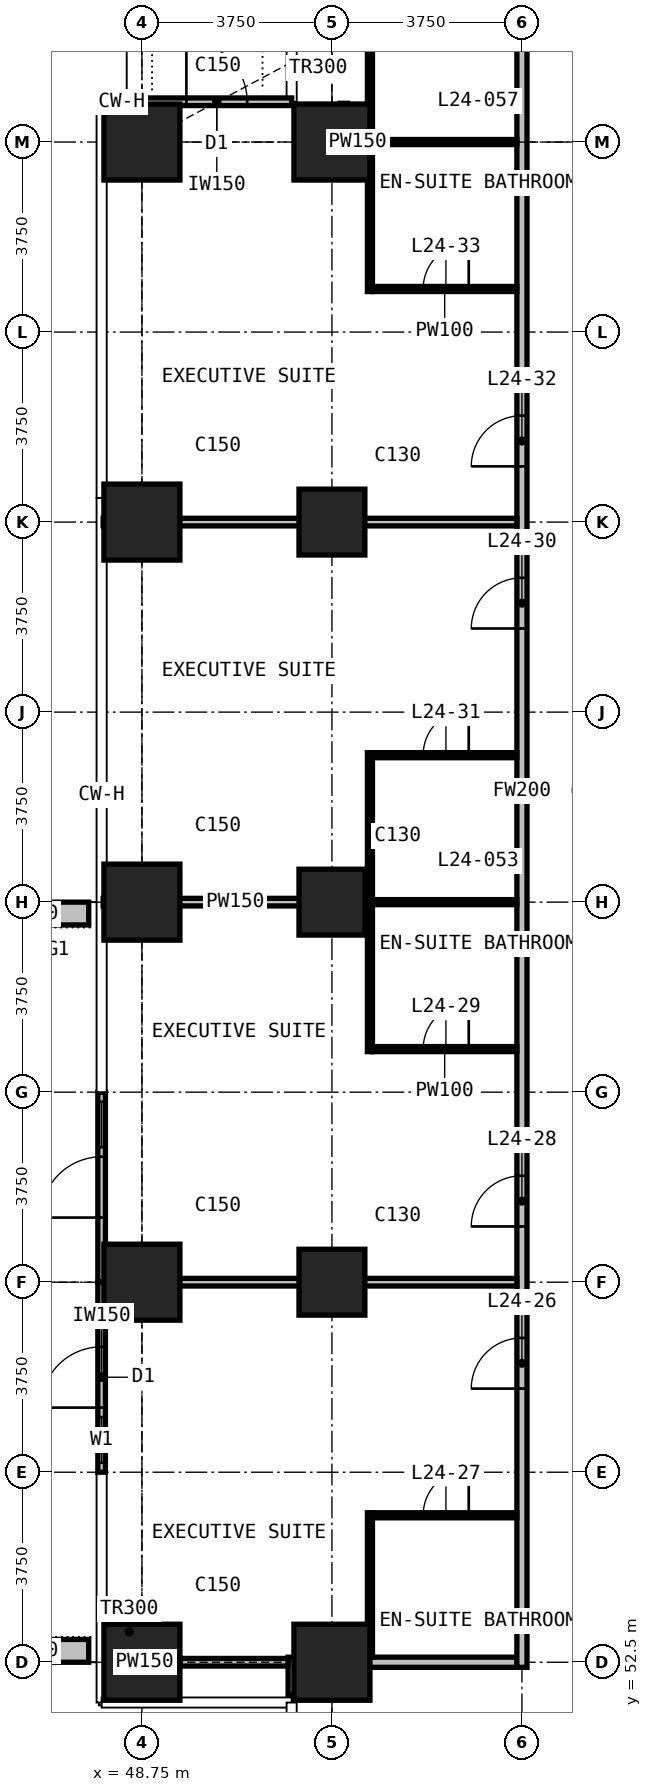
"""IFC4 building model, lengths in metres.
Left out: names, types, materials, properties, quantities, classifications, styles, units other than length and angle.
Written with IfcOpenShell. Run it as: python <this file> out.ifc"""

import sys

from ifc_helpers import new_model, si_unit, direction, frame, frame_2d, origin, origin_2d, place, context, subcontext, project, spatial, rectangle, extrude, element, fill, save


model = new_model("IFC4")
c1 = context("Model", 3, precision=1e-05, world=origin(), true_north=direction((0.0, 1.0)))
c2 = subcontext(c1, "Body", "Model", "MODEL_VIEW")
j1 = project(units=[si_unit("LENGTHUNIT", "METRE"), si_unit("PLANEANGLEUNIT", "RADIAN")], contexts=[c1])
p1 = place(None, origin())
s1 = spatial("IfcSite", under=j1, at=p1, CompositionType="ELEMENT")
p2 = place(p1, origin())
s2 = spatial("IfcBuilding", under=s1, at=p2, CompositionType="ELEMENT")
p3 = place(p2, frame((0.0, 0.0, 98.9)))
s3 = spatial("IfcBuildingStorey", under=s2, at=p3, CompositionType="ELEMENT", Elevation=98.9)
for number, where, z_axis, x_axis in (
    (1, (48.75, 52.5, 0.0), (0.0, 0.0, 1.0), (1.0, 0.0, 0.0)),
    (2, (48.75, 60.0, 0.0), (0.0, 0.0, 1.0), (1.0, 0.0, 0.0)),
    (3, (48.75, 67.5, 0.0), (0.0, 0.0, 1.0), (1.0, 0.0, 0.0)),
    (4, (48.75, 75.0, 0.0), (0.0, 0.0, 1.0), (1.0, 0.0, 0.0)),
    (5, (48.75, 82.5, 0.0), (0.0, 0.0, 1.0), (1.0, 0.0, 0.0)),
    (6, (52.5, 52.5, 0.0), (0.0, 0.0, 1.0), (1.0, 0.0, 0.0)),
):
    element("IfcColumn", number, at=place(p3, frame(where, z_axis=z_axis, x_axis=x_axis)), inside=s3, PredefinedType="COLUMN", context=c2, shape_type="SweptSolid", body=[
        extrude(rectangle(XDim=1.5, YDim=1.5, at=origin_2d()), origin(), (0.0, 0.0, 1.0), 3.3),
    ])
for number, where, z_axis, x_axis in (
    (7, (52.5, 60.0, 0.0), (0.0, 0.0, 1.0), (1.0, 0.0, 0.0)),
    (8, (52.5, 67.5, 0.0), (0.0, 0.0, 1.0), (1.0, 0.0, 0.0)),
    (9, (52.5, 75.0, 0.0), (0.0, 0.0, 1.0), (1.0, 0.0, 0.0)),
):
    element("IfcColumn", number, at=place(p3, frame(where, z_axis=z_axis, x_axis=x_axis)), inside=s3, PredefinedType="COLUMN", context=c2, shape_type="SweptSolid", body=[
        extrude(rectangle(XDim=1.3, YDim=1.3, at=origin_2d()), origin(), (0.0, 0.0, 1.0), 3.3),
    ])
p4 = place(p3, frame((52.5, 82.5, 0.0), z_axis=(0.0, 0.0, 1.0), x_axis=(1.0, 0.0, 0.0)))
e10 = element("IfcColumn", 10, at=p4, inside=s3, PredefinedType="COLUMN", context=c2, shape_type="SweptSolid", body=[
    extrude(rectangle(XDim=1.5, YDim=1.5, at=origin_2d()), origin(), (0.0, 0.0, 1.0), 3.3),
])
p5 = place(p3, frame((48.75, 83.295, 0.0), z_axis=(0.0, 0.0, 1.0), x_axis=(1.0, 0.0, 0.0)))
e11 = element("IfcWall", 11, at=p5, inside=s3, PredefinedType="SOLIDWALL", context=c2, shape_type="SweptSolid", body=[
    extrude(rectangle(XDim=2.955, YDim=0.15, at=frame_2d((1.478, 0.0))), origin(), (0.0, 0.0, 1.0), 2.95),
])
p6 = place(p5, frame((0.877, 0.0, 0.0)))
e12 = element("IfcOpeningElement", 12, at=p6, cuts=e11, PredefinedType="OPENING", context=c2, shape_type="SweptSolid", body=[
    extrude(rectangle(XDim=1.2, YDim=2.4, at=frame_2d((0.6, 1.2))), frame((0.0, 0.085, 0.0), z_axis=(0.0, -1.0, 0.0), x_axis=(1.0, 0.0, 0.0)), (0.0, 0.0, 1.0), 0.17),
])
p7 = place(p3, frame((47.955, 56.25, 0.0), z_axis=(0.0, 0.0, 1.0), x_axis=(0.0, 1.0, 0.0)))
e13 = element("IfcWall", 13, at=p7, inside=s3, PredefinedType="SOLIDWALL", context=c2, shape_type="SweptSolid", body=[
    extrude(rectangle(XDim=3.75, YDim=0.15, at=frame_2d((1.875, 0.0))), origin(), (0.0, 0.0, 1.0), 2.95),
])
p8 = place(p7, frame((0.188, 0.0, 0.1)))
e14 = element("IfcOpeningElement", 14, at=p8, cuts=e13, PredefinedType="OPENING", context=c2, shape_type="SweptSolid", body=[
    extrude(rectangle(XDim=0.9, YDim=2.4, at=frame_2d((0.45, 1.2))), frame((0.0, 0.085, 0.0), z_axis=(0.0, -1.0, 0.0), x_axis=(1.0, 0.0, 0.0)), (0.0, 0.0, 1.0), 0.17),
])
p9 = place(p7, frame((1.275, 0.0, 0.0)))
e15 = element("IfcOpeningElement", 15, at=p9, cuts=e13, PredefinedType="OPENING", context=c2, shape_type="SweptSolid", body=[
    extrude(rectangle(XDim=1.2, YDim=2.4, at=frame_2d((0.6, 1.2))), frame((0.0, 0.085, 0.0), z_axis=(0.0, -1.0, 0.0), x_axis=(1.0, 0.0, 0.0)), (0.0, 0.0, 1.0), 0.17),
])
p10 = place(p3, frame((47.955, 60.0, 0.0), z_axis=(0.0, 0.0, 1.0), x_axis=(0.0, 1.0, 0.0)))
e16 = element("IfcWall", 16, at=p10, inside=s3, PredefinedType="SOLIDWALL", context=c2, shape_type="SweptSolid", body=[
    extrude(rectangle(XDim=3.75, YDim=0.15, at=frame_2d((1.875, 0.0))), origin(), (0.0, 0.0, 1.0), 2.95),
])
p11 = place(p10, frame((1.275, 0.0, 0.0)))
e17 = element("IfcOpeningElement", 17, at=p11, cuts=e16, PredefinedType="OPENING", context=c2, shape_type="SweptSolid", body=[
    extrude(rectangle(XDim=1.2, YDim=2.4, at=frame_2d((0.6, 1.2))), frame((0.0, 0.085, 0.0), z_axis=(0.0, -1.0, 0.0), x_axis=(1.0, 0.0, 0.0)), (0.0, 0.0, 1.0), 0.17),
])
p12 = place(p10, frame((2.663, 0.0, 0.1)))
e18 = element("IfcOpeningElement", 18, at=p12, cuts=e16, PredefinedType="OPENING", context=c2, shape_type="SweptSolid", body=[
    extrude(rectangle(XDim=0.9, YDim=2.4, at=frame_2d((0.45, 1.2))), frame((0.0, 0.085, 0.0), z_axis=(0.0, -1.0, 0.0), x_axis=(1.0, 0.0, 0.0)), (0.0, 0.0, 1.0), 0.17),
])
for number, where, z_axis, x_axis in (
    (19, (47.7, 52.725, 0.0), (0.0, 0.0, 1.0), (-1.0, 0.0, 0.0)),
    (20, (47.7, 67.275, 0.0), (0.0, 0.0, 1.0), (-1.0, 0.0, 0.0)),
):
    element("IfcWall", number, at=place(p3, frame(where, z_axis=z_axis, x_axis=x_axis)), inside=s3, PredefinedType="USERDEFINED", context=c2, shape_type="SweptSolid", body=[
        extrude(rectangle(XDim=2.35, YDim=0.45, at=frame_2d((1.175, 0.0))), origin(), (0.0, 0.0, 1.0), 1.1),
    ])
p13 = place(p3, frame((51.835, 52.5, 0.0), z_axis=(0.0, 0.0, 1.0), x_axis=(1.0, 0.0, 0.0)))
e21 = element("IfcWall", 21, at=p13, inside=s3, PredefinedType="PARTITIONING", context=c2, shape_type="SweptSolid", body=[
    extrude(rectangle(XDim=4.315, YDim=0.2, at=frame_2d((2.157, 0.0))), origin(), (0.0, 0.0, 1.0), 2.95),
])
p14 = place(p3, frame((51.735, 51.855, 0.0), z_axis=(0.0, 0.0, 1.0), x_axis=(0.0, 1.0, 0.0)))
e22 = element("IfcWall", 22, at=p14, inside=s3, PredefinedType="PARTITIONING", context=c2, shape_type="SweptSolid", body=[
    extrude(rectangle(XDim=0.745, YDim=0.2, at=frame_2d((0.373, 0.0))), origin(), (0.0, 0.0, 1.0), 2.95),
])
p15 = place(p3, frame((56.25, 52.4, 0.0), z_axis=(0.0, 0.0, 1.0), x_axis=(0.0, 1.0, 0.0)))
e23 = element("IfcWall", 23, at=p15, inside=s3, PredefinedType="PARTITIONING", context=c2, shape_type="SweptSolid", body=[
    extrude(rectangle(XDim=34.6, YDim=0.2, at=frame_2d((17.3, 0.0))), origin(), (0.0, 0.0, 1.0), 2.95),
])
p16 = place(p15, frame((5.5, 0.0, 0.0)))
e24 = element("IfcOpeningElement", 24, at=p16, cuts=e23, PredefinedType="OPENING", context=c2, shape_type="SweptSolid", body=[
    extrude(rectangle(XDim=1.0, YDim=2.1, at=frame_2d((0.5, 1.05))), frame((0.0, 0.11, 0.0), z_axis=(0.0, -1.0, 0.0), x_axis=(1.0, 0.0, 0.0)), (0.0, 0.0, 1.0), 0.22),
])
p17 = place(p15, frame((8.7, 0.0, 0.0)))
e25 = element("IfcOpeningElement", 25, at=p17, cuts=e23, PredefinedType="OPENING", context=c2, shape_type="SweptSolid", body=[
    extrude(rectangle(XDim=1.0, YDim=2.2, at=frame_2d((0.5, 1.1))), frame((0.0, 0.11, 0.0), z_axis=(0.0, -1.0, 0.0), x_axis=(1.0, 0.0, 0.0)), (0.0, 0.0, 1.0), 0.22),
])
p18 = place(p15, frame((20.5, 0.0, 0.0)))
e26 = element("IfcOpeningElement", 26, at=p18, cuts=e23, PredefinedType="OPENING", context=c2, shape_type="SweptSolid", body=[
    extrude(rectangle(XDim=1.0, YDim=2.2, at=frame_2d((0.5, 1.1))), frame((0.0, 0.11, 0.0), z_axis=(0.0, -1.0, 0.0), x_axis=(1.0, 0.0, 0.0)), (0.0, 0.0, 1.0), 0.22),
])
p19 = place(p15, frame((23.7, 0.0, 0.0)))
e27 = element("IfcOpeningElement", 27, at=p19, cuts=e23, PredefinedType="OPENING", context=c2, shape_type="SweptSolid", body=[
    extrude(rectangle(XDim=1.0, YDim=2.2, at=frame_2d((0.5, 1.1))), frame((0.0, 0.11, 0.0), z_axis=(0.0, -1.0, 0.0), x_axis=(1.0, 0.0, 0.0)), (0.0, 0.0, 1.0), 0.22),
])
p20 = place(p3, frame((48.105, 52.5, 0.0), z_axis=(0.0, 0.0, 1.0), x_axis=(1.0, 0.0, 0.0)))
e28 = element("IfcWall", 28, at=p20, inside=s3, PredefinedType="PARTITIONING", context=c2, shape_type="SweptSolid", body=[
    extrude(rectangle(XDim=1.395, YDim=0.15, at=frame_2d((0.698, 0.0))), origin(), (0.0, 0.0, 1.0), 2.95),
])
p21 = place(p3, frame((49.5, 52.5, 0.0), z_axis=(0.0, 0.0, 1.0), x_axis=(1.0, 0.0, 0.0)))
e29 = element("IfcWall", 29, at=p21, inside=s3, PredefinedType="PARTITIONING", context=c2, shape_type="SweptSolid", body=[
    extrude(rectangle(XDim=2.135, YDim=0.15, at=frame_2d((1.067, 0.0))), origin(), (0.0, 0.0, 1.0), 2.15),
])
p22 = place(p3, frame((48.04, 60.0, 0.0), z_axis=(0.0, 0.0, 1.0), x_axis=(1.0, 0.0, 0.0)))
e30 = element("IfcWall", 30, at=p22, inside=s3, PredefinedType="PARTITIONING", context=c2, shape_type="SweptSolid", body=[
    extrude(rectangle(XDim=8.11, YDim=0.15, at=frame_2d((4.055, 0.0))), origin(), (0.0, 0.0, 1.0), 2.95),
])
p23 = place(p3, frame((47.985, 67.5, 0.0), z_axis=(0.0, 0.0, 1.0), x_axis=(1.0, 0.0, 0.0)))
e31 = element("IfcWall", 31, at=p23, inside=s3, PredefinedType="PARTITIONING", context=c2, shape_type="SweptSolid", body=[
    extrude(rectangle(XDim=5.215, YDim=0.15, at=frame_2d((2.607, 0.0))), origin(), (0.0, 0.0, 1.0), 2.95),
])
p24 = place(p3, frame((47.985, 75.0, 0.0), z_axis=(0.0, 0.0, 1.0), x_axis=(1.0, 0.0, 0.0)))
e32 = element("IfcWall", 32, at=p24, inside=s3, PredefinedType="PARTITIONING", context=c2, shape_type="SweptSolid", body=[
    extrude(rectangle(XDim=8.165, YDim=0.15, at=frame_2d((4.083, 0.0))), origin(), (0.0, 0.0, 1.0), 2.95),
])
p25 = place(p3, frame((52.81, 82.5, 0.0), z_axis=(0.0, 0.0, 1.0), x_axis=(1.0, 0.0, 0.0)))
e33 = element("IfcWall", 33, at=p25, inside=s3, PredefinedType="PARTITIONING", context=c2, shape_type="SweptSolid", body=[
    extrude(rectangle(XDim=0.39, YDim=0.15, at=frame_2d((0.195, 0.0))), origin(), (0.0, 0.0, 1.0), 2.95),
])
p26 = place(p3, frame((52.735, 82.425, 0.0), z_axis=(0.0, 0.0, 1.0), x_axis=(0.0, 1.0, 0.0)))
e34 = element("IfcWall", 34, at=p26, inside=s3, PredefinedType="PARTITIONING", context=c2, shape_type="SweptSolid", body=[
    extrude(rectangle(XDim=0.84, YDim=0.15, at=frame_2d((0.42, 0.0))), origin(), (0.0, 0.0, 1.0), 2.95),
])
p27 = place(p3, frame((53.3, 55.4, 0.0), z_axis=(0.0, 0.0, 1.0), x_axis=(1.0, 0.0, 0.0)))
e35 = element("IfcWall", 35, at=p27, inside=s3, PredefinedType="PARTITIONING", context=c2, shape_type="SweptSolid", body=[
    extrude(rectangle(XDim=2.85, YDim=0.1, at=frame_2d((1.425, 0.0))), origin(), (0.0, 0.0, 1.0), 2.95),
])
p28 = place(p27, frame((1.0, 0.0, 0.0)))
e36 = element("IfcOpeningElement", 36, at=p28, cuts=e35, PredefinedType="OPENING", context=c2, shape_type="SweptSolid", body=[
    extrude(rectangle(XDim=0.9, YDim=2.2, at=frame_2d((0.45, 1.1))), frame((0.0, 0.06, 0.0), z_axis=(0.0, -1.0, 0.0), x_axis=(1.0, 0.0, 0.0)), (0.0, 0.0, 1.0), 0.12),
])
p29 = place(p3, frame((53.3, 64.6, 0.0), z_axis=(0.0, 0.0, 1.0), x_axis=(1.0, 0.0, 0.0)))
e37 = element("IfcWall", 37, at=p29, inside=s3, PredefinedType="PARTITIONING", context=c2, shape_type="SweptSolid", body=[
    extrude(rectangle(XDim=2.85, YDim=0.1, at=frame_2d((1.425, 0.0))), origin(), (0.0, 0.0, 1.0), 2.95),
])
p30 = place(p29, frame((1.0, 0.0, 0.0)))
e38 = element("IfcOpeningElement", 38, at=p30, cuts=e37, PredefinedType="OPENING", context=c2, shape_type="SweptSolid", body=[
    extrude(rectangle(XDim=0.9, YDim=2.2, at=frame_2d((0.45, 1.1))), frame((0.0, 0.06, 0.0), z_axis=(0.0, -1.0, 0.0), x_axis=(1.0, 0.0, 0.0)), (0.0, 0.0, 1.0), 0.12),
])
p31 = place(p3, frame((53.3, 67.5, 0.0), z_axis=(0.0, 0.0, 1.0), x_axis=(1.0, 0.0, 0.0)))
e39 = element("IfcWall", 39, at=p31, inside=s3, PredefinedType="PARTITIONING", context=c2, shape_type="SweptSolid", body=[
    extrude(rectangle(XDim=2.85, YDim=0.1, at=frame_2d((1.425, 0.0))), origin(), (0.0, 0.0, 1.0), 2.95),
])
p32 = place(p3, frame((53.3, 70.4, 0.0), z_axis=(0.0, 0.0, 1.0), x_axis=(1.0, 0.0, 0.0)))
e40 = element("IfcWall", 40, at=p32, inside=s3, PredefinedType="PARTITIONING", context=c2, shape_type="SweptSolid", body=[
    extrude(rectangle(XDim=2.85, YDim=0.1, at=frame_2d((1.425, 0.0))), origin(), (0.0, 0.0, 1.0), 2.95),
])
p33 = place(p32, frame((1.0, 0.0, 0.0)))
e41 = element("IfcOpeningElement", 41, at=p33, cuts=e40, PredefinedType="OPENING", context=c2, shape_type="SweptSolid", body=[
    extrude(rectangle(XDim=0.9, YDim=2.2, at=frame_2d((0.45, 1.1))), frame((0.0, 0.06, 0.0), z_axis=(0.0, -1.0, 0.0), x_axis=(1.0, 0.0, 0.0)), (0.0, 0.0, 1.0), 0.12),
])
p34 = place(p3, frame((53.3, 79.6, 0.0), z_axis=(0.0, 0.0, 1.0), x_axis=(1.0, 0.0, 0.0)))
e42 = element("IfcWall", 42, at=p34, inside=s3, PredefinedType="PARTITIONING", context=c2, shape_type="SweptSolid", body=[
    extrude(rectangle(XDim=2.85, YDim=0.1, at=frame_2d((1.425, 0.0))), origin(), (0.0, 0.0, 1.0), 2.95),
])
p35 = place(p34, frame((1.0, 0.0, 0.0)))
e43 = element("IfcOpeningElement", 43, at=p35, cuts=e42, PredefinedType="OPENING", context=c2, shape_type="SweptSolid", body=[
    extrude(rectangle(XDim=0.9, YDim=2.2, at=frame_2d((0.45, 1.1))), frame((0.0, 0.06, 0.0), z_axis=(0.0, -1.0, 0.0), x_axis=(1.0, 0.0, 0.0)), (0.0, 0.0, 1.0), 0.12),
])
p36 = place(p3, frame((53.3, 82.5, 0.0), z_axis=(0.0, 0.0, 1.0), x_axis=(1.0, 0.0, 0.0)))
e44 = element("IfcWall", 44, at=p36, inside=s3, PredefinedType="PARTITIONING", context=c2, shape_type="SweptSolid", body=[
    extrude(rectangle(XDim=2.85, YDim=0.1, at=frame_2d((1.425, 0.0))), origin(), (0.0, 0.0, 1.0), 2.05),
])
p37 = place(p3, frame((53.25, 52.6, 0.0), z_axis=(0.0, 0.0, 1.0), x_axis=(0.0, 1.0, 0.0)))
e45 = element("IfcWall", 45, at=p37, inside=s3, PredefinedType="PARTITIONING", context=c2, shape_type="SweptSolid", body=[
    extrude(rectangle(XDim=2.85, YDim=0.1, at=frame_2d((1.425, 0.0))), origin(), (0.0, 0.0, 1.0), 2.95),
])
for number, where, z_axis, x_axis in (
    (46, (53.25, 64.55, 0.0), (0.0, 0.0, 1.0), (0.0, 1.0, 0.0)),
    (47, (53.25, 79.55, 0.0), (0.0, 0.0, 1.0), (0.0, 1.0, 0.0)),
):
    element("IfcWall", number, at=place(p3, frame(where, z_axis=z_axis, x_axis=x_axis)), inside=s3, PredefinedType="PARTITIONING", context=c2, shape_type="SweptSolid", body=[
        extrude(rectangle(XDim=5.9, YDim=0.1, at=frame_2d((2.95, 0.0))), origin(), (0.0, 0.0, 1.0), 2.95),
    ])
p38 = place(p6, origin())
e48 = element("IfcDoor", 48, at=p38, inside=s3, OperationType="SINGLE_SWING_LEFT", PredefinedType="DOOR", context=c2, shape_type="SweptSolid", body=[
    extrude(rectangle(XDim=1.2, YDim=2.4, at=frame_2d((0.6, 1.2))), frame((0.0, 0.025, 0.0), z_axis=(0.0, -1.0, 0.0), x_axis=(1.0, 0.0, 0.0)), (0.0, 0.0, 1.0), 0.05),
])
fill(e12, e48)
p39 = place(p8, origin())
e49 = element("IfcWindow", 49, at=p39, inside=s3, PartitioningType="SINGLE_PANEL", PredefinedType="WINDOW", context=c2, shape_type="SweptSolid", body=[
    extrude(rectangle(XDim=0.9, YDim=2.4, at=frame_2d((0.45, 1.2))), frame((0.0, 0.03, 0.0), z_axis=(0.0, -1.0, 0.0), x_axis=(1.0, 0.0, 0.0)), (0.0, 0.0, 1.0), 0.06),
])
fill(e14, e49)
p40 = place(p9, origin())
e50 = element("IfcDoor", 50, at=p40, inside=s3, OperationType="SINGLE_SWING_LEFT", PredefinedType="DOOR", context=c2, shape_type="SweptSolid", body=[
    extrude(rectangle(XDim=1.2, YDim=2.4, at=frame_2d((0.6, 1.2))), frame((0.0, 0.025, 0.0), z_axis=(0.0, -1.0, 0.0), x_axis=(1.0, 0.0, 0.0)), (0.0, 0.0, 1.0), 0.05),
])
fill(e15, e50)
p41 = place(p11, origin())
e51 = element("IfcDoor", 51, at=p41, inside=s3, OperationType="SINGLE_SWING_LEFT", PredefinedType="DOOR", context=c2, shape_type="SweptSolid", body=[
    extrude(rectangle(XDim=1.2, YDim=2.4, at=frame_2d((0.6, 1.2))), frame((0.0, 0.025, 0.0), z_axis=(0.0, -1.0, 0.0), x_axis=(1.0, 0.0, 0.0)), (0.0, 0.0, 1.0), 0.05),
])
fill(e17, e51)
p42 = place(p12, origin())
e52 = element("IfcWindow", 52, at=p42, inside=s3, PartitioningType="SINGLE_PANEL", PredefinedType="WINDOW", context=c2, shape_type="SweptSolid", body=[
    extrude(rectangle(XDim=0.9, YDim=2.4, at=frame_2d((0.45, 1.2))), frame((0.0, 0.03, 0.0), z_axis=(0.0, -1.0, 0.0), x_axis=(1.0, 0.0, 0.0)), (0.0, 0.0, 1.0), 0.06),
])
fill(e18, e52)
p43 = place(p16, origin())
e53 = element("IfcDoor", 53, at=p43, inside=s3, OperationType="SINGLE_SWING_LEFT", PredefinedType="DOOR", context=c2, shape_type="SweptSolid", body=[
    extrude(rectangle(XDim=1.0, YDim=2.1, at=frame_2d((0.5, 1.05))), frame((0.0, 0.025, 0.0), z_axis=(0.0, -1.0, 0.0), x_axis=(1.0, 0.0, 0.0)), (0.0, 0.0, 1.0), 0.05),
])
fill(e24, e53)
p44 = place(p28, origin())
e54 = element("IfcDoor", 54, at=p44, inside=s3, OperationType="SINGLE_SWING_RIGHT", PredefinedType="DOOR", context=c2, shape_type="SweptSolid", body=[
    extrude(rectangle(XDim=0.9, YDim=2.2, at=frame_2d((0.45, 1.1))), frame((0.0, 0.025, 0.0), z_axis=(0.0, -1.0, 0.0), x_axis=(1.0, 0.0, 0.0)), (0.0, 0.0, 1.0), 0.05),
])
fill(e36, e54)
p45 = place(p17, origin())
e55 = element("IfcDoor", 55, at=p45, inside=s3, OperationType="SINGLE_SWING_LEFT", PredefinedType="DOOR", context=c2, shape_type="SweptSolid", body=[
    extrude(rectangle(XDim=1.0, YDim=2.2, at=frame_2d((0.5, 1.1))), frame((0.0, 0.025, 0.0), z_axis=(0.0, -1.0, 0.0), x_axis=(1.0, 0.0, 0.0)), (0.0, 0.0, 1.0), 0.05),
])
fill(e25, e55)
p46 = place(p30, origin())
e56 = element("IfcDoor", 56, at=p46, inside=s3, OperationType="SINGLE_SWING_RIGHT", PredefinedType="DOOR", context=c2, shape_type="SweptSolid", body=[
    extrude(rectangle(XDim=0.9, YDim=2.2, at=frame_2d((0.45, 1.1))), frame((0.0, 0.025, 0.0), z_axis=(0.0, -1.0, 0.0), x_axis=(1.0, 0.0, 0.0)), (0.0, 0.0, 1.0), 0.05),
])
fill(e38, e56)
p47 = place(p18, origin())
e57 = element("IfcDoor", 57, at=p47, inside=s3, OperationType="SINGLE_SWING_LEFT", PredefinedType="DOOR", context=c2, shape_type="SweptSolid", body=[
    extrude(rectangle(XDim=1.0, YDim=2.2, at=frame_2d((0.5, 1.1))), frame((0.0, 0.025, 0.0), z_axis=(0.0, -1.0, 0.0), x_axis=(1.0, 0.0, 0.0)), (0.0, 0.0, 1.0), 0.05),
])
fill(e26, e57)
p48 = place(p33, origin())
e58 = element("IfcDoor", 58, at=p48, inside=s3, OperationType="SINGLE_SWING_RIGHT", PredefinedType="DOOR", context=c2, shape_type="SweptSolid", body=[
    extrude(rectangle(XDim=0.9, YDim=2.2, at=frame_2d((0.45, 1.1))), frame((0.0, 0.025, 0.0), z_axis=(0.0, -1.0, 0.0), x_axis=(1.0, 0.0, 0.0)), (0.0, 0.0, 1.0), 0.05),
])
fill(e41, e58)
p49 = place(p19, origin())
e59 = element("IfcDoor", 59, at=p49, inside=s3, OperationType="SINGLE_SWING_LEFT", PredefinedType="DOOR", context=c2, shape_type="SweptSolid", body=[
    extrude(rectangle(XDim=1.0, YDim=2.2, at=frame_2d((0.5, 1.1))), frame((0.0, 0.025, 0.0), z_axis=(0.0, -1.0, 0.0), x_axis=(1.0, 0.0, 0.0)), (0.0, 0.0, 1.0), 0.05),
])
fill(e27, e59)
p50 = place(p35, origin())
e60 = element("IfcDoor", 60, at=p50, inside=s3, OperationType="SINGLE_SWING_RIGHT", PredefinedType="DOOR", context=c2, shape_type="SweptSolid", body=[
    extrude(rectangle(XDim=0.9, YDim=2.2, at=frame_2d((0.45, 1.1))), frame((0.0, 0.025, 0.0), z_axis=(0.0, -1.0, 0.0), x_axis=(1.0, 0.0, 0.0)), (0.0, 0.0, 1.0), 0.05),
])
fill(e43, e60)
save(model, sys.argv[1])
